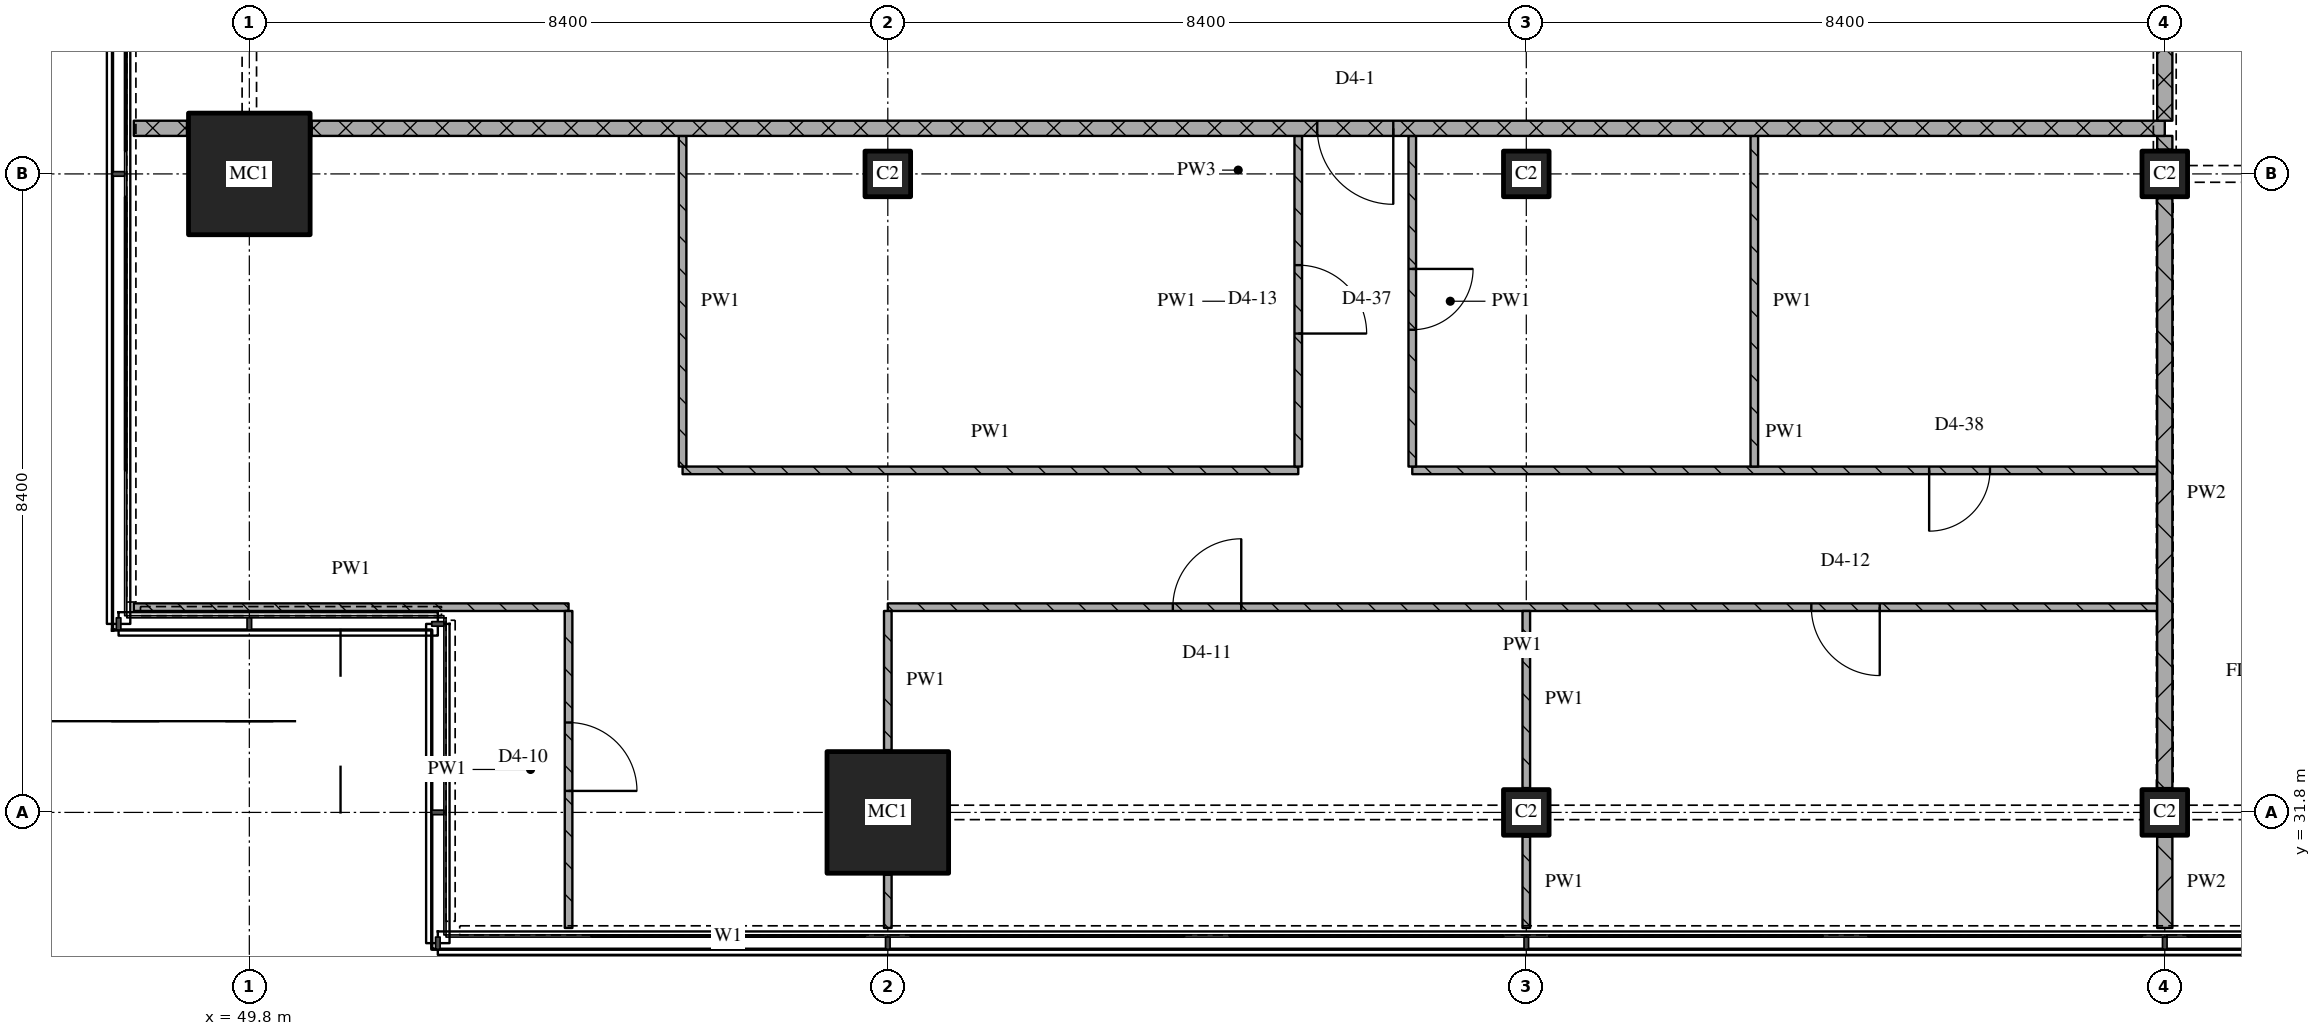
"""IFC4 building model, lengths in metres.
Left out: names, types, materials, properties, quantities, classifications, styles, units other than length and angle.
Written with IfcOpenShell. Run it as: python <this file> out.ifc"""

import sys

from ifc_helpers import new_model, si_unit, direction, frame, frame_2d, origin, origin_2d, place, context, subcontext, project, spatial, rectangle, extrude, element, fill, save


model = new_model("IFC4")
c1 = context("Model", 3, precision=1e-05, world=origin(), true_north=direction((0.0, 1.0)))
c2 = subcontext(c1, "Body", "Model", "MODEL_VIEW")
j1 = project(units=[si_unit("LENGTHUNIT", "METRE"), si_unit("PLANEANGLEUNIT", "RADIAN")], contexts=[c1])
p1 = place(None, origin())
s1 = spatial("IfcSite", under=j1, at=p1, CompositionType="ELEMENT")
p2 = place(p1, origin())
s2 = spatial("IfcBuilding", under=s1, at=p2, CompositionType="ELEMENT")
p3 = place(p2, frame((0.0, 0.0, 245.1)))
s3 = spatial("IfcBuildingStorey", under=s2, at=p3, CompositionType="ELEMENT", Elevation=245.1)
for number, where, z_axis, x_axis in (
    (1, (49.8, 40.2, 0.0), (0.0, 0.0, 1.0), (1.0, 0.0, 0.0)),
    (2, (58.2, 31.8, 0.0), (0.0, 0.0, 1.0), (1.0, 0.0, 0.0)),
):
    element("IfcColumn", number, at=place(p3, frame(where, z_axis=z_axis, x_axis=x_axis)), inside=s3, PredefinedType="COLUMN", context=c2, shape_type="SweptSolid", body=[
        extrude(rectangle(XDim=1.6, YDim=1.6, at=origin_2d()), origin(), (0.0, 0.0, 1.0), 3.6),
    ])
for number, where, z_axis, x_axis in (
    (3, (58.2, 40.2, 0.0), (0.0, 0.0, 1.0), (1.0, 0.0, 0.0)),
    (4, (66.6, 31.8, 0.0), (0.0, 0.0, 1.0), (1.0, 0.0, 0.0)),
    (5, (66.6, 40.2, 0.0), (0.0, 0.0, 1.0), (1.0, 0.0, 0.0)),
    (6, (75.0, 31.8, 0.0), (0.0, 0.0, 1.0), (1.0, 0.0, 0.0)),
    (7, (75.0, 40.2, 0.0), (0.0, 0.0, 1.0), (1.0, 0.0, 0.0)),
):
    element("IfcColumn", number, at=place(p3, frame(where, z_axis=z_axis, x_axis=x_axis)), inside=s3, PredefinedType="COLUMN", context=c2, shape_type="SweptSolid", body=[
        extrude(rectangle(XDim=0.6, YDim=0.6, at=origin_2d()), origin(), (0.0, 0.0, 1.0), 3.6),
    ])
p4 = place(p3, frame((48.28, 34.5, 0.0), z_axis=(0.0, 0.0, 1.0), x_axis=(1.0, 0.0, 0.0)))
e8 = element("IfcWall", 8, at=p4, inside=s3, PredefinedType="PARTITIONING", context=c2, shape_type="SweptSolid", body=[
    extrude(rectangle(XDim=5.72, YDim=0.1, at=frame_2d((2.86, 0.0))), origin(), (0.0, 0.0, 1.0), 3.32),
])
p5 = place(p3, frame((74.9, 34.5, 0.0), z_axis=(0.0, 0.0, 1.0), x_axis=(-1.0, 0.0, 0.0)))
e9 = element("IfcWall", 9, at=p5, inside=s3, PredefinedType="PARTITIONING", context=c2, shape_type="SweptSolid", body=[
    extrude(rectangle(XDim=16.7, YDim=0.1, at=frame_2d((8.35, 0.0))), origin(), (0.0, 0.0, 1.0), 3.32),
])
p6 = place(p5, frame((3.65, 0.0, 0.0)))
e10 = element("IfcOpeningElement", 10, at=p6, cuts=e9, PredefinedType="OPENING", context=c2, shape_type="SweptSolid", body=[
    extrude(rectangle(XDim=0.9, YDim=2.1, at=frame_2d((0.45, 1.05))), frame((0.0, 0.06, 0.0), z_axis=(0.0, -1.0, 0.0), x_axis=(1.0, 0.0, 0.0)), (0.0, 0.0, 1.0), 0.12),
])
p7 = place(p5, frame((12.05, 0.0, 0.0)))
e11 = element("IfcOpeningElement", 11, at=p7, cuts=e9, PredefinedType="OPENING", context=c2, shape_type="SweptSolid", body=[
    extrude(rectangle(XDim=0.9, YDim=2.1, at=frame_2d((0.45, 1.05))), frame((0.0, 0.06, 0.0), z_axis=(0.0, -1.0, 0.0), x_axis=(1.0, 0.0, 0.0)), (0.0, 0.0, 1.0), 0.12),
])
p8 = place(p3, frame((55.5, 36.3, 0.0), z_axis=(0.0, 0.0, 1.0), x_axis=(1.0, 0.0, 0.0)))
e12 = element("IfcWall", 12, at=p8, inside=s3, PredefinedType="PARTITIONING", context=c2, shape_type="SweptSolid", body=[
    extrude(rectangle(XDim=8.1, YDim=0.1, at=frame_2d((4.05, 0.0))), origin(), (0.0, 0.0, 1.0), 3.32),
])
p9 = place(p3, frame((65.1, 36.3, 0.0), z_axis=(0.0, 0.0, 1.0), x_axis=(1.0, 0.0, 0.0)))
e13 = element("IfcWall", 13, at=p9, inside=s3, PredefinedType="PARTITIONING", context=c2, shape_type="SweptSolid", body=[
    extrude(rectangle(XDim=9.8, YDim=0.1, at=frame_2d((4.9, 0.0))), origin(), (0.0, 0.0, 1.0), 3.32),
])
p10 = place(p9, frame((6.8, 0.0, 0.0)))
e14 = element("IfcOpeningElement", 14, at=p10, cuts=e13, PredefinedType="OPENING", context=c2, shape_type="SweptSolid", body=[
    extrude(rectangle(XDim=0.8, YDim=2.1, at=frame_2d((0.4, 1.05))), frame((0.0, 0.06, 0.0), z_axis=(0.0, -1.0, 0.0), x_axis=(1.0, 0.0, 0.0)), (0.0, 0.0, 1.0), 0.12),
])
p11 = place(p3, frame((48.28, 40.8, 0.0), z_axis=(0.0, 0.0, 1.0), x_axis=(1.0, 0.0, 0.0)))
e15 = element("IfcWall", 15, at=p11, inside=s3, PredefinedType="PARTITIONING", context=c2, shape_type="SweptSolid", body=[
    extrude(rectangle(XDim=0.7, YDim=0.2, at=frame_2d((0.35, 0.0))), origin(), (0.0, 0.0, 1.0), 3.32),
])
p12 = place(p3, frame((75.0, 40.8, 0.0), z_axis=(0.0, 0.0, 1.0), x_axis=(-1.0, 0.0, 0.0)))
e16 = element("IfcWall", 16, at=p12, inside=s3, PredefinedType="PARTITIONING", context=c2, shape_type="SweptSolid", body=[
    extrude(rectangle(XDim=24.38, YDim=0.2, at=frame_2d((12.19, 0.0))), origin(), (0.0, 0.0, 1.0), 3.32),
])
p13 = place(p12, frame((10.15, 0.0, 0.0)))
e17 = element("IfcOpeningElement", 17, at=p13, cuts=e16, PredefinedType="OPENING", context=c2, shape_type="SweptSolid", body=[
    extrude(rectangle(XDim=1.0, YDim=2.1, at=frame_2d((0.5, 1.05))), frame((0.0, 0.11, 0.0), z_axis=(0.0, -1.0, 0.0), x_axis=(1.0, 0.0, 0.0)), (0.0, 0.0, 1.0), 0.22),
])
p14 = place(p3, frame((54.0, 30.28, 0.0), z_axis=(0.0, 0.0, 1.0), x_axis=(0.0, 1.0, 0.0)))
e18 = element("IfcWall", 18, at=p14, inside=s3, PredefinedType="PARTITIONING", context=c2, shape_type="SweptSolid", body=[
    extrude(rectangle(XDim=4.17, YDim=0.1, at=frame_2d((2.085, 0.0))), origin(), (0.0, 0.0, 1.0), 3.32),
])
p15 = place(p14, frame((1.803, 0.0, 0.0)))
e19 = element("IfcOpeningElement", 19, at=p15, cuts=e18, PredefinedType="OPENING", context=c2, shape_type="SweptSolid", body=[
    extrude(rectangle(XDim=0.9, YDim=2.1, at=frame_2d((0.45, 1.05))), frame((0.0, 0.06, 0.0), z_axis=(0.0, -1.0, 0.0), x_axis=(1.0, 0.0, 0.0)), (0.0, 0.0, 1.0), 0.12),
])
p16 = place(p3, frame((55.5, 40.7, 0.0), z_axis=(0.0, 0.0, 1.0), x_axis=(0.0, -1.0, 0.0)))
e20 = element("IfcWall", 20, at=p16, inside=s3, PredefinedType="PARTITIONING", context=c2, shape_type="SweptSolid", body=[
    extrude(rectangle(XDim=4.35, YDim=0.1, at=frame_2d((2.175, 0.0))), origin(), (0.0, 0.0, 1.0), 3.32),
])
p17 = place(p3, frame((58.2, 30.98, 0.0), z_axis=(0.0, 0.0, 1.0), x_axis=(0.0, -1.0, 0.0)))
e21 = element("IfcWall", 21, at=p17, inside=s3, PredefinedType="PARTITIONING", context=c2, shape_type="SweptSolid", body=[
    extrude(rectangle(XDim=0.7, YDim=0.1, at=frame_2d((0.35, 0.0))), origin(), (0.0, 0.0, 1.0), 3.32),
])
p18 = place(p3, frame((58.2, 34.45, 0.0), z_axis=(0.0, 0.0, 1.0), x_axis=(0.0, -1.0, 0.0)))
e22 = element("IfcWall", 22, at=p18, inside=s3, PredefinedType="PARTITIONING", context=c2, shape_type="SweptSolid", body=[
    extrude(rectangle(XDim=1.83, YDim=0.1, at=frame_2d((0.915, 0.0))), origin(), (0.0, 0.0, 1.0), 3.32),
])
p19 = place(p3, frame((63.6, 36.35, 0.0), z_axis=(0.0, 0.0, 1.0), x_axis=(0.0, 1.0, 0.0)))
e23 = element("IfcWall", 23, at=p19, inside=s3, PredefinedType="PARTITIONING", context=c2, shape_type="SweptSolid", body=[
    extrude(rectangle(XDim=4.35, YDim=0.1, at=frame_2d((2.175, 0.0))), origin(), (0.0, 0.0, 1.0), 3.32),
])
p20 = place(p19, frame((1.75, 0.0, 0.0)))
e24 = element("IfcOpeningElement", 24, at=p20, cuts=e23, PredefinedType="OPENING", context=c2, shape_type="SweptSolid", body=[
    extrude(rectangle(XDim=0.9, YDim=2.1, at=frame_2d((0.45, 1.05))), frame((0.0, 0.06, 0.0), z_axis=(0.0, -1.0, 0.0), x_axis=(1.0, 0.0, 0.0)), (0.0, 0.0, 1.0), 0.12),
])
p21 = place(p3, frame((65.1, 40.7, 0.0), z_axis=(0.0, 0.0, 1.0), x_axis=(0.0, -1.0, 0.0)))
e25 = element("IfcWall", 25, at=p21, inside=s3, PredefinedType="PARTITIONING", context=c2, shape_type="SweptSolid", body=[
    extrude(rectangle(XDim=4.35, YDim=0.1, at=frame_2d((2.175, 0.0))), origin(), (0.0, 0.0, 1.0), 3.32),
])
p22 = place(p21, frame((1.75, 0.0, 0.0)))
e26 = element("IfcOpeningElement", 26, at=p22, cuts=e25, PredefinedType="OPENING", context=c2, shape_type="SweptSolid", body=[
    extrude(rectangle(XDim=0.8, YDim=2.1, at=frame_2d((0.4, 1.05))), frame((0.0, 0.06, 0.0), z_axis=(0.0, -1.0, 0.0), x_axis=(1.0, 0.0, 0.0)), (0.0, 0.0, 1.0), 0.12),
])
p23 = place(p3, frame((66.6, 31.48, 0.0), z_axis=(0.0, 0.0, 1.0), x_axis=(0.0, -1.0, 0.0)))
e27 = element("IfcWall", 27, at=p23, inside=s3, PredefinedType="PARTITIONING", context=c2, shape_type="SweptSolid", body=[
    extrude(rectangle(XDim=1.2, YDim=0.1, at=frame_2d((0.6, 0.0))), origin(), (0.0, 0.0, 1.0), 3.32),
])
p24 = place(p3, frame((66.6, 34.45, 0.0), z_axis=(0.0, 0.0, 1.0), x_axis=(0.0, -1.0, 0.0)))
e28 = element("IfcWall", 28, at=p24, inside=s3, PredefinedType="PARTITIONING", context=c2, shape_type="SweptSolid", body=[
    extrude(rectangle(XDim=2.33, YDim=0.1, at=frame_2d((1.165, 0.0))), origin(), (0.0, 0.0, 1.0), 3.32),
])
p25 = place(p3, frame((69.6, 40.7, 0.0), z_axis=(0.0, 0.0, 1.0), x_axis=(0.0, -1.0, 0.0)))
e29 = element("IfcWall", 29, at=p25, inside=s3, PredefinedType="PARTITIONING", context=c2, shape_type="SweptSolid", body=[
    extrude(rectangle(XDim=4.35, YDim=0.1, at=frame_2d((2.175, 0.0))), origin(), (0.0, 0.0, 1.0), 3.32),
])
p26 = place(p3, frame((75.0, 43.1, 0.0), z_axis=(0.0, 0.0, 1.0), x_axis=(0.0, -1.0, 0.0)))
e30 = element("IfcWall", 30, at=p26, inside=s3, PredefinedType="PARTITIONING", context=c2, shape_type="SweptSolid", body=[
    extrude(rectangle(XDim=2.2, YDim=0.2, at=frame_2d((1.1, 0.0))), origin(), (0.0, 0.0, 1.0), 2.53),
])
p27 = place(p3, frame((75.0, 31.48, 0.0), z_axis=(0.0, 0.0, 1.0), x_axis=(0.0, -1.0, 0.0)))
e31 = element("IfcWall", 31, at=p27, inside=s3, PredefinedType="PARTITIONING", context=c2, shape_type="SweptSolid", body=[
    extrude(rectangle(XDim=1.2, YDim=0.2, at=frame_2d((0.6, 0.0))), origin(), (0.0, 0.0, 1.0), 3.32),
])
p28 = place(p3, frame((75.0, 39.88, 0.0), z_axis=(0.0, 0.0, 1.0), x_axis=(0.0, -1.0, 0.0)))
e32 = element("IfcWall", 32, at=p28, inside=s3, PredefinedType="PARTITIONING", context=c2, shape_type="SweptSolid", body=[
    extrude(rectangle(XDim=7.76, YDim=0.2, at=frame_2d((3.88, 0.0))), origin(), (0.0, 0.0, 1.0), 2.72),
])
p29 = place(p3, frame((75.0, 40.7, 0.0), z_axis=(0.0, 0.0, 1.0), x_axis=(0.0, -1.0, 0.0)))
e33 = element("IfcWall", 33, at=p29, inside=s3, PredefinedType="PARTITIONING", context=c2, shape_type="SweptSolid", body=[
    extrude(rectangle(XDim=0.18, YDim=0.2, at=frame_2d((0.09, 0.0))), origin(), (0.0, 0.0, 1.0), 3.32),
])
p30 = place(p6, origin())
e34 = element("IfcDoor", 34, at=p30, inside=s3, OperationType="SINGLE_SWING_LEFT", PredefinedType="DOOR", context=c2, shape_type="SweptSolid", body=[
    extrude(rectangle(XDim=0.9, YDim=2.1, at=frame_2d((0.45, 1.05))), frame((0.0, 0.025, 0.0), z_axis=(0.0, -1.0, 0.0), x_axis=(1.0, 0.0, 0.0)), (0.0, 0.0, 1.0), 0.05),
])
fill(e10, e34)
p31 = place(p7, origin())
e35 = element("IfcDoor", 35, at=p31, inside=s3, OperationType="SINGLE_SWING_RIGHT", PredefinedType="DOOR", context=c2, shape_type="SweptSolid", body=[
    extrude(rectangle(XDim=0.9, YDim=2.1, at=frame_2d((0.45, 1.05))), frame((0.0, 0.025, 0.0), z_axis=(0.0, -1.0, 0.0), x_axis=(1.0, 0.0, 0.0)), (0.0, 0.0, 1.0), 0.05),
])
fill(e11, e35)
p32 = place(p10, origin())
e36 = element("IfcDoor", 36, at=p32, inside=s3, OperationType="SINGLE_SWING_RIGHT", PredefinedType="DOOR", context=c2, shape_type="SweptSolid", body=[
    extrude(rectangle(XDim=0.8, YDim=2.1, at=frame_2d((0.4, 1.05))), frame((0.0, 0.025, 0.0), z_axis=(0.0, -1.0, 0.0), x_axis=(1.0, 0.0, 0.0)), (0.0, 0.0, 1.0), 0.05),
])
fill(e14, e36)
p33 = place(p13, origin())
e37 = element("IfcDoor", 37, at=p33, inside=s3, OperationType="SINGLE_SWING_LEFT", PredefinedType="DOOR", context=c2, shape_type="SweptSolid", body=[
    extrude(rectangle(XDim=1.0, YDim=2.1, at=frame_2d((0.5, 1.05))), frame((0.0, 0.025, 0.0), z_axis=(0.0, -1.0, 0.0), x_axis=(1.0, 0.0, 0.0)), (0.0, 0.0, 1.0), 0.05),
])
fill(e17, e37)
p34 = place(p15, origin())
e38 = element("IfcDoor", 38, at=p34, inside=s3, OperationType="SINGLE_SWING_RIGHT", PredefinedType="DOOR", context=c2, shape_type="SweptSolid", body=[
    extrude(rectangle(XDim=0.9, YDim=2.1, at=frame_2d((0.45, 1.05))), frame((0.0, 0.025, 0.0), z_axis=(0.0, -1.0, 0.0), x_axis=(1.0, 0.0, 0.0)), (0.0, 0.0, 1.0), 0.05),
])
fill(e19, e38)
p35 = place(p20, origin())
e39 = element("IfcDoor", 39, at=p35, inside=s3, OperationType="SINGLE_SWING_RIGHT", PredefinedType="DOOR", context=c2, shape_type="SweptSolid", body=[
    extrude(rectangle(XDim=0.9, YDim=2.1, at=frame_2d((0.45, 1.05))), frame((0.0, 0.025, 0.0), z_axis=(0.0, -1.0, 0.0), x_axis=(1.0, 0.0, 0.0)), (0.0, 0.0, 1.0), 0.05),
])
fill(e24, e39)
p36 = place(p22, origin())
e40 = element("IfcDoor", 40, at=p36, inside=s3, OperationType="SINGLE_SWING_LEFT", PredefinedType="DOOR", context=c2, shape_type="SweptSolid", body=[
    extrude(rectangle(XDim=0.8, YDim=2.1, at=frame_2d((0.4, 1.05))), frame((0.0, 0.025, 0.0), z_axis=(0.0, -1.0, 0.0), x_axis=(1.0, 0.0, 0.0)), (0.0, 0.0, 1.0), 0.05),
])
fill(e26, e40)
save(model, sys.argv[1])
